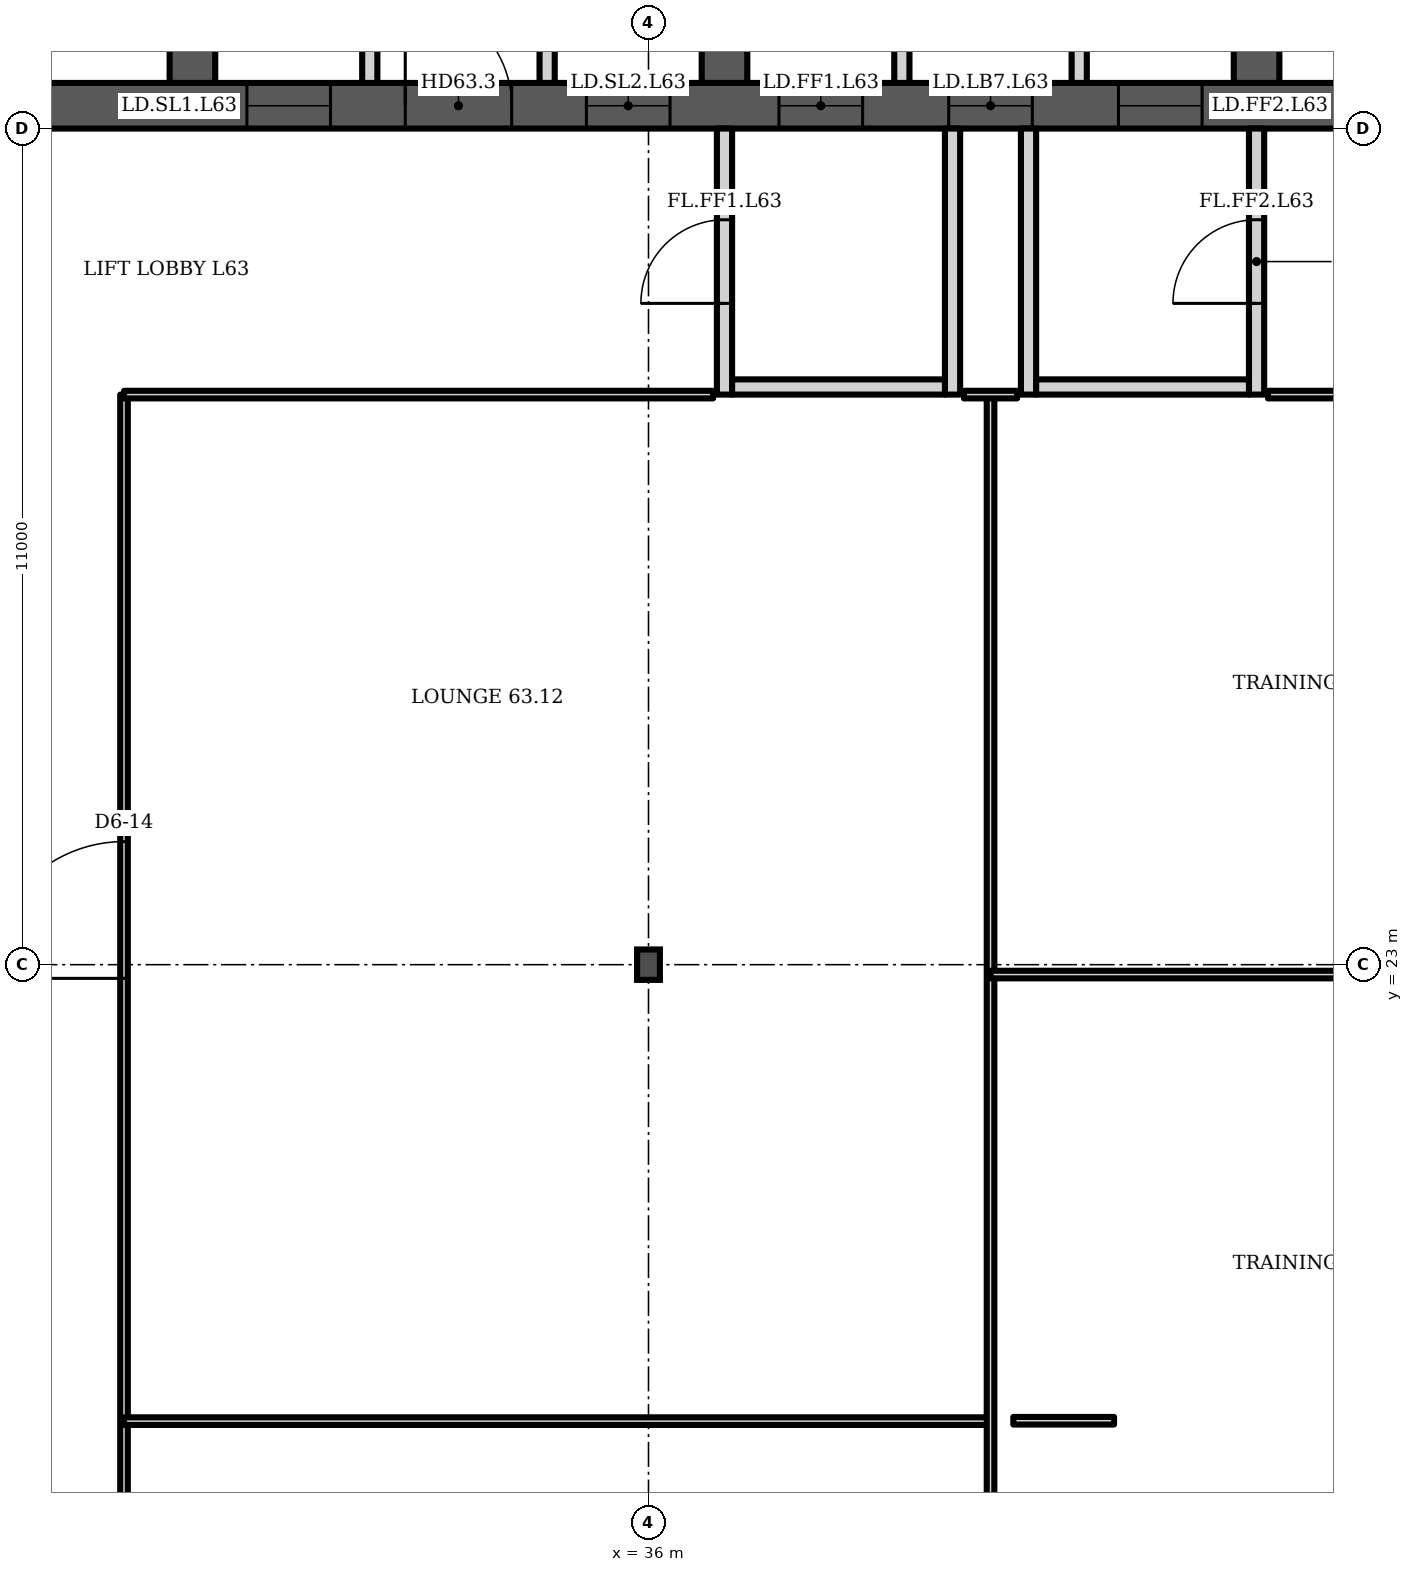
"""IFC4 building model, lengths in metres.
Left out: names, types, materials, properties, quantities, classifications, styles, units other than length and angle.
Written with IfcOpenShell. Run it as: python <this file> out.ifc"""

import sys

from ifc_helpers import new_model, si_unit, direction, frame, frame_2d, origin, origin_2d, place, context, subcontext, project, spatial, polyline, rectangle, i_section, outline, extrude, element, fill, save


model = new_model("IFC4")
c1 = context("Model", 3, precision=1e-05, world=origin(), true_north=direction((0.0, 1.0)))
c2 = subcontext(c1, "Body", "Model", "MODEL_VIEW")
j1 = project(units=[si_unit("LENGTHUNIT", "METRE"), si_unit("PLANEANGLEUNIT", "RADIAN")], contexts=[c1])
p1 = place(None, origin())
s1 = spatial("IfcSite", under=j1, at=p1, CompositionType="ELEMENT")
p2 = place(p1, origin())
s2 = spatial("IfcBuilding", under=s1, at=p2, CompositionType="ELEMENT")
p3 = place(p2, frame((0.0, 0.0, 250.3)))
s3 = spatial("IfcBuildingStorey", under=s2, at=p3, CompositionType="ELEMENT", Elevation=250.3)
p4 = place(p3, frame((23.0, 34.3, 0.0), z_axis=(0.0, 0.0, 1.0), x_axis=(1.0, 0.0, 0.0)))
e1 = element("IfcWall", 1, at=p4, inside=s3, PredefinedType="SHEAR", context=c2, shape_type="SweptSolid", body=[
    extrude(rectangle(XDim=35.0, YDim=0.6, at=frame_2d((17.5, 0.0))), origin(), (0.0, 0.0, 1.0), 3.6),
])
p5 = place(p4, frame((0.65, 0.0, 0.0)))
e2 = element("IfcOpeningElement", 2, at=p5, cuts=e1, PredefinedType="OPENING", context=c2, shape_type="SweptSolid", body=[
    extrude(rectangle(XDim=1.2, YDim=2.1, at=frame_2d((0.6, 1.05))), frame((0.0, 0.31, 0.0), z_axis=(0.0, -1.0, 0.0), x_axis=(1.0, 0.0, 0.0)), (0.0, 0.0, 1.0), 0.62),
])
p6 = place(p4, frame((7.717, 0.0, 0.0)))
e3 = element("IfcOpeningElement", 3, at=p6, cuts=e1, PredefinedType="OPENING", context=c2, shape_type="SweptSolid", body=[
    extrude(rectangle(XDim=1.1, YDim=2.1, at=frame_2d((0.55, 1.05))), frame((0.0, 0.31, 0.0), z_axis=(0.0, -1.0, 0.0), x_axis=(1.0, 0.0, 0.0)), (0.0, 0.0, 1.0), 0.62),
])
p7 = place(p4, frame((12.183, 0.0, 0.0)))
e4 = element("IfcOpeningElement", 4, at=p7, cuts=e1, PredefinedType="OPENING", context=c2, shape_type="SweptSolid", body=[
    extrude(rectangle(XDim=1.1, YDim=2.1, at=frame_2d((0.55, 1.05))), frame((0.0, 0.31, 0.0), z_axis=(0.0, -1.0, 0.0), x_axis=(1.0, 0.0, 0.0)), (0.0, 0.0, 1.0), 0.62),
])
p8 = place(p4, frame((9.8, 0.0, 0.0)))
e5 = element("IfcOpeningElement", 5, at=p8, cuts=e1, PredefinedType="OPENING", context=c2, shape_type="SweptSolid", body=[
    extrude(rectangle(XDim=1.4, YDim=2.1, at=frame_2d((0.7, 1.05))), frame((0.0, 0.31, 0.0), z_axis=(0.0, -1.0, 0.0), x_axis=(1.0, 0.0, 0.0)), (0.0, 0.0, 1.0), 0.62),
])
p9 = place(p4, frame((14.717, 0.0, 0.0)))
e6 = element("IfcOpeningElement", 6, at=p9, cuts=e1, PredefinedType="OPENING", context=c2, shape_type="SweptSolid", body=[
    extrude(rectangle(XDim=1.1, YDim=2.1, at=frame_2d((0.55, 1.05))), frame((0.0, 0.31, 0.0), z_axis=(0.0, -1.0, 0.0), x_axis=(1.0, 0.0, 0.0)), (0.0, 0.0, 1.0), 0.62),
])
p10 = place(p4, frame((16.95, 0.0, 0.0)))
e7 = element("IfcOpeningElement", 7, at=p10, cuts=e1, PredefinedType="OPENING", context=c2, shape_type="SweptSolid", body=[
    extrude(rectangle(XDim=1.1, YDim=2.1, at=frame_2d((0.55, 1.05))), frame((0.0, 0.31, 0.0), z_axis=(0.0, -1.0, 0.0), x_axis=(1.0, 0.0, 0.0)), (0.0, 0.0, 1.0), 0.62),
])
p11 = place(p4, frame((19.183, 0.0, 0.0)))
e8 = element("IfcOpeningElement", 8, at=p11, cuts=e1, PredefinedType="OPENING", context=c2, shape_type="SweptSolid", body=[
    extrude(rectangle(XDim=1.1, YDim=2.1, at=frame_2d((0.55, 1.05))), frame((0.0, 0.31, 0.0), z_axis=(0.0, -1.0, 0.0), x_axis=(1.0, 0.0, 0.0)), (0.0, 0.0, 1.0), 0.62),
])
p12 = place(p4, frame((26.15, 0.0, 0.0)))
e9 = element("IfcOpeningElement", 9, at=p12, cuts=e1, PredefinedType="OPENING", context=c2, shape_type="SweptSolid", body=[
    extrude(rectangle(XDim=1.2, YDim=2.1, at=frame_2d((0.6, 1.05))), frame((0.0, 0.31, 0.0), z_axis=(0.0, -1.0, 0.0), x_axis=(1.0, 0.0, 0.0)), (0.0, 0.0, 1.0), 0.62),
])
p13 = place(p4, frame((28.767, 0.0, 0.0)))
e10 = element("IfcOpeningElement", 10, at=p13, cuts=e1, PredefinedType="OPENING", context=c2, shape_type="SweptSolid", body=[
    extrude(rectangle(XDim=1.0, YDim=2.1, at=frame_2d((0.5, 1.05))), frame((0.0, 0.31, 0.0), z_axis=(0.0, -1.0, 0.0), x_axis=(1.0, 0.0, 0.0)), (0.0, 0.0, 1.0), 0.62),
])
p14 = place(p4, frame((33.083, 0.0, 0.0)))
e11 = element("IfcOpeningElement", 11, at=p14, cuts=e1, PredefinedType="OPENING", context=c2, shape_type="SweptSolid", body=[
    extrude(rectangle(XDim=1.0, YDim=2.1, at=frame_2d((0.5, 1.05))), frame((0.0, 0.31, 0.0), z_axis=(0.0, -1.0, 0.0), x_axis=(1.0, 0.0, 0.0)), (0.0, 0.0, 1.0), 0.62),
])
p15 = place(p4, frame((30.8, 0.0, 0.0)))
e12 = element("IfcOpeningElement", 12, at=p15, cuts=e1, PredefinedType="OPENING", context=c2, shape_type="SweptSolid", body=[
    extrude(rectangle(XDim=1.4, YDim=2.1, at=frame_2d((0.7, 1.05))), frame((0.0, 0.31, 0.0), z_axis=(0.0, -1.0, 0.0), x_axis=(1.0, 0.0, 0.0)), (0.0, 0.0, 1.0), 0.62),
])
p16 = place(p3, frame((30.0, 34.6, 0.0), z_axis=(0.0, 0.0, 1.0), x_axis=(0.0, 1.0, 0.0)))
e13 = element("IfcWall", 13, at=p16, inside=s3, PredefinedType="SHEAR", context=c2, shape_type="SweptSolid", body=[
    extrude(rectangle(XDim=14.171, YDim=0.6, at=frame_2d((7.085, 0.0))), origin(), (0.0, 0.0, 1.0), 3.6),
])
p17 = place(p16, frame((3.8, 0.0, 0.0)))
e14 = element("IfcOpeningElement", 14, at=p17, cuts=e13, PredefinedType="OPENING", context=c2, shape_type="SweptSolid", body=[
    extrude(rectangle(XDim=1.1, YDim=2.1, at=frame_2d((0.55, 1.05))), frame((0.0, 0.31, 0.0), z_axis=(0.0, -1.0, 0.0), x_axis=(1.0, 0.0, 0.0)), (0.0, 0.0, 1.0), 0.62),
])
p18 = place(p3, frame((37.0, 34.6, 0.0), z_axis=(0.0, 0.0, 1.0), x_axis=(0.0, 1.0, 0.0)))
e15 = element("IfcWall", 15, at=p18, inside=s3, PredefinedType="SHEAR", context=c2, shape_type="SweptSolid", body=[
    extrude(rectangle(XDim=14.784, YDim=0.6, at=frame_2d((7.392, 0.0))), origin(), (0.0, 0.0, 1.0), 3.6),
])
p19 = place(p18, frame((11.302, 0.0, 0.0)))
e16 = element("IfcOpeningElement", 16, at=p19, cuts=e15, PredefinedType="OPENING", context=c2, shape_type="SweptSolid", body=[
    extrude(rectangle(XDim=1.0, YDim=2.1, at=frame_2d((0.5, 1.05))), frame((0.0, 0.31, 0.0), z_axis=(0.0, -1.0, 0.0), x_axis=(1.0, 0.0, 0.0)), (0.0, 0.0, 1.0), 0.62),
])
p20 = place(p18, frame((3.8, 0.0, 0.0)))
e17 = element("IfcOpeningElement", 17, at=p20, cuts=e15, PredefinedType="OPENING", context=c2, shape_type="SweptSolid", body=[
    extrude(rectangle(XDim=1.1, YDim=2.1, at=frame_2d((0.55, 1.05))), frame((0.0, 0.31, 0.0), z_axis=(0.0, -1.0, 0.0), x_axis=(1.0, 0.0, 0.0)), (0.0, 0.0, 1.0), 0.62),
])
p21 = place(p3, frame((44.0, 34.6, 0.0), z_axis=(0.0, 0.0, 1.0), x_axis=(0.0, 1.0, 0.0)))
e18 = element("IfcWall", 18, at=p21, inside=s3, PredefinedType="SHEAR", context=c2, shape_type="SweptSolid", body=[
    extrude(rectangle(XDim=14.784, YDim=0.6, at=frame_2d((7.392, 0.0))), origin(), (0.0, 0.0, 1.0), 3.6),
])
p22 = place(p21, frame((11.608, 0.0, 0.0)))
e19 = element("IfcOpeningElement", 19, at=p22, cuts=e18, PredefinedType="OPENING", context=c2, shape_type="SweptSolid", body=[
    extrude(rectangle(XDim=1.0, YDim=2.1, at=frame_2d((0.5, 1.05))), frame((0.0, 0.31, 0.0), z_axis=(0.0, -1.0, 0.0), x_axis=(1.0, 0.0, 0.0)), (0.0, 0.0, 1.0), 0.62),
])
p23 = place(p21, frame((3.8, 0.0, 0.0)))
e20 = element("IfcOpeningElement", 20, at=p23, cuts=e18, PredefinedType="OPENING", context=c2, shape_type="SweptSolid", body=[
    extrude(rectangle(XDim=1.1, YDim=2.1, at=frame_2d((0.55, 1.05))), frame((0.0, 0.31, 0.0), z_axis=(0.0, -1.0, 0.0), x_axis=(1.0, 0.0, 0.0)), (0.0, 0.0, 1.0), 0.62),
])
p24 = place(p3, frame((36.0, 23.0, 0.0), z_axis=(0.0, 0.0, 1.0), x_axis=(1.0, 0.0, 0.0)))
e21 = element("IfcColumn", 21, at=p24, inside=s3, PredefinedType="COLUMN", context=c2, shape_type="SweptSolid", body=[
    extrude(i_section(OverallWidth=0.3, OverallDepth=0.4, WebThickness=0.013, FlangeThickness=0.024, FilletRadius=0.027, at=origin_2d()), origin(), (0.0, 0.0, 1.0), 3.6),
])
p25 = place(p3, frame((0.0, 0.0, -0.0)))
e22 = element("IfcWall", 22, at=p25, inside=s3, PredefinedType="PARTITIONING", context=c2, shape_type="SweptSolid", body=[
    extrude(outline(polyline([(32.233, 37.45), (30.3, 37.45), (30.3, 37.65), (32.233, 37.65), (32.433, 37.65), (32.433, 34.6), (32.233, 34.6), (32.233, 37.45)])), origin(), (0.0, 0.0, 1.0), 3.2),
])
p26 = place(p3, frame((0.0, 0.0, -0.0)))
e23 = element("IfcWall", 23, at=p26, inside=s3, PredefinedType="PARTITIONING", context=c2, shape_type="SweptSolid", body=[
    extrude(outline(polyline([(34.567, 37.65), (34.767, 37.65), (36.7, 37.65), (36.7, 37.45), (34.767, 37.45), (34.767, 34.6), (34.567, 34.6), (34.567, 37.65)])), origin(), (0.0, 0.0, 1.0), 3.2),
])
p27 = place(p3, frame((0.0, 0.0, -0.0)))
e24 = element("IfcWall", 24, at=p27, inside=s3, PredefinedType="PARTITIONING", context=c2, shape_type="SweptSolid", body=[
    extrude(outline(polyline([(41.567, 37.1), (39.433, 37.1), (39.433, 34.6), (39.233, 34.6), (39.233, 37.45), (37.3, 37.45), (37.3, 37.65), (39.233, 37.65), (39.433, 37.65), (39.433, 37.3), (41.567, 37.3), (41.567, 37.35), (41.767, 37.35), (43.7, 37.35), (43.7, 37.15), (41.767, 37.15), (41.767, 34.6), (41.567, 34.6), (41.567, 37.1)])), origin(), (0.0, 0.0, 1.0), 3.2),
])
p28 = place(p3, frame((37.0, 30.5, 0.0), z_axis=(0.0, 0.0, 1.0), x_axis=(0.0, 1.0, 0.0)))
e25 = element("IfcWall", 25, at=p28, inside=s3, PredefinedType="PARTITIONING", context=c2, shape_type="SweptSolid", body=[
    extrude(rectangle(XDim=3.5, YDim=0.2, at=frame_2d((1.75, 0.0))), origin(), (0.0, 0.0, 1.0), 3.2),
])
p29 = place(p28, frame((1.2, 0.0, 0.0)))
e26 = element("IfcOpeningElement", 26, at=p29, cuts=e25, PredefinedType="OPENING", context=c2, shape_type="SweptSolid", body=[
    extrude(rectangle(XDim=1.1, YDim=2.1, at=frame_2d((0.55, 1.05))), frame((0.0, 0.11, 0.0), z_axis=(0.0, -1.0, 0.0), x_axis=(1.0, 0.0, 0.0)), (0.0, 0.0, 1.0), 0.22),
])
p30 = place(p3, frame((40.0, 30.5, 0.0), z_axis=(0.0, 0.0, 1.0), x_axis=(0.0, 1.0, 0.0)))
e27 = element("IfcWall", 27, at=p30, inside=s3, PredefinedType="PARTITIONING", context=c2, shape_type="SweptSolid", body=[
    extrude(rectangle(XDim=3.5, YDim=0.2, at=frame_2d((1.75, 0.0))), origin(), (0.0, 0.0, 1.0), 3.2),
])
p31 = place(p3, frame((37.1, 30.6, 0.0), z_axis=(0.0, 0.0, 1.0), x_axis=(1.0, 0.0, 0.0)))
e28 = element("IfcWall", 28, at=p31, inside=s3, PredefinedType="PARTITIONING", context=c2, shape_type="SweptSolid", body=[
    extrude(rectangle(XDim=2.8, YDim=0.2, at=frame_2d((1.4, 0.0))), origin(), (0.0, 0.0, 1.0), 3.2),
])
p32 = place(p3, frame((41.0, 30.5, 0.0), z_axis=(0.0, 0.0, 1.0), x_axis=(0.0, 1.0, 0.0)))
e29 = element("IfcWall", 29, at=p32, inside=s3, PredefinedType="PARTITIONING", context=c2, shape_type="SweptSolid", body=[
    extrude(rectangle(XDim=3.5, YDim=0.2, at=frame_2d((1.75, 0.0))), origin(), (0.0, 0.0, 1.0), 3.2),
])
p33 = place(p3, frame((44.0, 30.5, 0.0), z_axis=(0.0, 0.0, 1.0), x_axis=(0.0, 1.0, 0.0)))
e30 = element("IfcWall", 30, at=p33, inside=s3, PredefinedType="PARTITIONING", context=c2, shape_type="SweptSolid", body=[
    extrude(rectangle(XDim=3.5, YDim=0.2, at=frame_2d((1.75, 0.0))), origin(), (0.0, 0.0, 1.0), 3.2),
])
p34 = place(p33, frame((1.2, 0.0, 0.0)))
e31 = element("IfcOpeningElement", 31, at=p34, cuts=e30, PredefinedType="OPENING", context=c2, shape_type="SweptSolid", body=[
    extrude(rectangle(XDim=1.1, YDim=2.1, at=frame_2d((0.55, 1.05))), frame((0.0, 0.11, 0.0), z_axis=(0.0, -1.0, 0.0), x_axis=(1.0, 0.0, 0.0)), (0.0, 0.0, 1.0), 0.22),
])
p35 = place(p3, frame((41.1, 30.6, 0.0), z_axis=(0.0, 0.0, 1.0), x_axis=(1.0, 0.0, 0.0)))
e32 = element("IfcWall", 32, at=p35, inside=s3, PredefinedType="PARTITIONING", context=c2, shape_type="SweptSolid", body=[
    extrude(rectangle(XDim=2.8, YDim=0.2, at=frame_2d((1.4, 0.0))), origin(), (0.0, 0.0, 1.0), 3.2),
])
p36 = place(p3, frame((29.1, 5.725, 0.0), z_axis=(0.0, 0.0, 1.0), x_axis=(0.0, 1.0, 0.0)))
e33 = element("IfcWall", 33, at=p36, inside=s3, PredefinedType="PARTITIONING", context=c2, shape_type="SweptSolid", body=[
    extrude(rectangle(XDim=24.775, YDim=0.1, at=frame_2d((12.387, 0.0))), origin(), (0.0, 0.0, 1.0), 3.2),
])
p37 = place(p36, frame((5.22, 0.0, 0.0)))
e34 = element("IfcOpeningElement", 34, at=p37, cuts=e33, PredefinedType="OPENING", context=c2, shape_type="SweptSolid", body=[
    extrude(rectangle(XDim=1.0, YDim=2.1, at=frame_2d((0.5, 1.05))), frame((0.0, 0.06, 0.0), z_axis=(0.0, -1.0, 0.0), x_axis=(1.0, 0.0, 0.0)), (0.0, 0.0, 1.0), 0.12),
])
p38 = place(p36, frame((17.095, 0.0, 0.0)))
e35 = element("IfcOpeningElement", 35, at=p38, cuts=e33, PredefinedType="OPENING", context=c2, shape_type="SweptSolid", body=[
    extrude(rectangle(XDim=1.8, YDim=2.1, at=frame_2d((0.9, 1.05))), frame((0.0, 0.06, 0.0), z_axis=(0.0, -1.0, 0.0), x_axis=(1.0, 0.0, 0.0)), (0.0, 0.0, 1.0), 0.12),
])
p39 = place(p3, frame((29.1, 16.995, 0.0), z_axis=(0.0, 0.0, 1.0), x_axis=(1.0, 0.0, 0.0)))
e36 = element("IfcWall", 36, at=p39, inside=s3, PredefinedType="PARTITIONING", context=c2, shape_type="SweptSolid", body=[
    extrude(rectangle(XDim=11.4, YDim=0.1, at=frame_2d((5.7, 0.0))), origin(), (0.0, 0.0, 1.0), 3.2),
])
p40 = place(p3, frame((29.1, 30.5, 0.0), z_axis=(0.0, 0.0, 1.0), x_axis=(1.0, 0.0, 0.0)))
e37 = element("IfcWall", 37, at=p40, inside=s3, PredefinedType="PARTITIONING", context=c2, shape_type="SweptSolid", body=[
    extrude(rectangle(XDim=7.75, YDim=0.1, at=frame_2d((3.875, 0.0))), origin(), (0.0, 0.0, 1.0), 3.2),
])
p41 = place(p3, frame((40.5, 13.463, 0.0), z_axis=(0.0, 0.0, 1.0), x_axis=(0.0, 1.0, 0.0)))
e38 = element("IfcWall", 38, at=p41, inside=s3, PredefinedType="PARTITIONING", context=c2, shape_type="SweptSolid", body=[
    extrude(rectangle(XDim=17.037, YDim=0.1, at=frame_2d((8.519, 0.0))), origin(), (0.0, 0.0, 1.0), 3.2),
])
p42 = place(p3, frame((40.5, 22.87, 0.0), z_axis=(0.0, 0.0, 1.0), x_axis=(1.0, 0.0, 0.0)))
e39 = element("IfcWall", 39, at=p42, inside=s3, PredefinedType="PARTITIONING", context=c2, shape_type="SweptSolid", body=[
    extrude(rectangle(XDim=9.52, YDim=0.1, at=frame_2d((4.76, 0.0))), origin(), (0.0, 0.0, 1.0), 3.2),
])
p43 = place(p3, frame((40.8, 17.0, 0.0), z_axis=(0.0, 0.0, 1.0), x_axis=(1.0, 0.0, 0.0)))
e40 = element("IfcWall", 40, at=p43, inside=s3, PredefinedType="PARTITIONING", context=c2, shape_type="SweptSolid", body=[
    extrude(rectangle(XDim=1.325, YDim=0.1, at=frame_2d((0.663, 0.0))), origin(), (0.0, 0.0, 1.0), 3.2),
])
p44 = place(p3, frame((40.15, 30.5, 0.0), z_axis=(0.0, 0.0, 1.0), x_axis=(1.0, 0.0, 0.0)))
e41 = element("IfcWall", 41, at=p44, inside=s3, PredefinedType="PARTITIONING", context=c2, shape_type="SweptSolid", body=[
    extrude(rectangle(XDim=0.7, YDim=0.1, at=frame_2d((0.35, 0.0))), origin(), (0.0, 0.0, 1.0), 3.2),
])
p45 = place(p3, frame((44.15, 30.5, 0.0), z_axis=(0.0, 0.0, 1.0), x_axis=(1.0, 0.0, 0.0)))
e42 = element("IfcWall", 42, at=p45, inside=s3, PredefinedType="PARTITIONING", context=c2, shape_type="SweptSolid", body=[
    extrude(rectangle(XDim=5.87, YDim=0.1, at=frame_2d((2.935, 0.0))), origin(), (0.0, 0.0, 1.0), 3.2),
])
p46 = place(p6, origin())
e43 = element("IfcDoor", 43, at=p46, inside=s3, OperationType="DOUBLE_DOOR_SLIDING", PredefinedType="DOOR", context=c2, shape_type="SweptSolid", body=[
    extrude(rectangle(XDim=1.1, YDim=2.1, at=frame_2d((0.55, 1.05))), frame((0.0, 0.025, 0.0), z_axis=(0.0, -1.0, 0.0), x_axis=(1.0, 0.0, 0.0)), (0.0, 0.0, 1.0), 0.05),
])
fill(e3, e43)
p47 = place(p7, origin())
e44 = element("IfcDoor", 44, at=p47, inside=s3, OperationType="DOUBLE_DOOR_SLIDING", PredefinedType="DOOR", context=c2, shape_type="SweptSolid", body=[
    extrude(rectangle(XDim=1.1, YDim=2.1, at=frame_2d((0.55, 1.05))), frame((0.0, 0.025, 0.0), z_axis=(0.0, -1.0, 0.0), x_axis=(1.0, 0.0, 0.0)), (0.0, 0.0, 1.0), 0.05),
])
fill(e4, e44)
p48 = place(p8, origin())
e45 = element("IfcDoor", 45, at=p48, inside=s3, OperationType="DOUBLE_DOOR_SINGLE_SWING", PredefinedType="DOOR", context=c2, shape_type="SweptSolid", body=[
    extrude(rectangle(XDim=1.4, YDim=2.1, at=frame_2d((0.7, 1.05))), frame((0.0, 0.025, 0.0), z_axis=(0.0, -1.0, 0.0), x_axis=(1.0, 0.0, 0.0)), (0.0, 0.0, 1.0), 0.05),
])
fill(e5, e45)
p49 = place(p9, origin())
e46 = element("IfcDoor", 46, at=p49, inside=s3, OperationType="DOUBLE_DOOR_SLIDING", PredefinedType="DOOR", context=c2, shape_type="SweptSolid", body=[
    extrude(rectangle(XDim=1.1, YDim=2.1, at=frame_2d((0.55, 1.05))), frame((0.0, 0.025, 0.0), z_axis=(0.0, -1.0, 0.0), x_axis=(1.0, 0.0, 0.0)), (0.0, 0.0, 1.0), 0.05),
])
fill(e6, e46)
p50 = place(p10, origin())
e47 = element("IfcDoor", 47, at=p50, inside=s3, OperationType="DOUBLE_DOOR_SLIDING", PredefinedType="DOOR", context=c2, shape_type="SweptSolid", body=[
    extrude(rectangle(XDim=1.1, YDim=2.1, at=frame_2d((0.55, 1.05))), frame((0.0, 0.025, 0.0), z_axis=(0.0, -1.0, 0.0), x_axis=(1.0, 0.0, 0.0)), (0.0, 0.0, 1.0), 0.05),
])
fill(e7, e47)
p51 = place(p11, origin())
e48 = element("IfcDoor", 48, at=p51, inside=s3, OperationType="DOUBLE_DOOR_SLIDING", PredefinedType="DOOR", context=c2, shape_type="SweptSolid", body=[
    extrude(rectangle(XDim=1.1, YDim=2.1, at=frame_2d((0.55, 1.05))), frame((0.0, 0.025, 0.0), z_axis=(0.0, -1.0, 0.0), x_axis=(1.0, 0.0, 0.0)), (0.0, 0.0, 1.0), 0.05),
])
fill(e8, e48)
p52 = place(p29, origin())
e49 = element("IfcDoor", 49, at=p52, inside=s3, OperationType="SINGLE_SWING_LEFT", PredefinedType="DOOR", context=c2, shape_type="SweptSolid", body=[
    extrude(rectangle(XDim=1.1, YDim=2.1, at=frame_2d((0.55, 1.05))), frame((0.0, 0.025, 0.0), z_axis=(0.0, -1.0, 0.0), x_axis=(1.0, 0.0, 0.0)), (0.0, 0.0, 1.0), 0.05),
])
fill(e26, e49)
p53 = place(p34, origin())
e50 = element("IfcDoor", 50, at=p53, inside=s3, OperationType="SINGLE_SWING_LEFT", PredefinedType="DOOR", context=c2, shape_type="SweptSolid", body=[
    extrude(rectangle(XDim=1.1, YDim=2.1, at=frame_2d((0.55, 1.05))), frame((0.0, 0.025, 0.0), z_axis=(0.0, -1.0, 0.0), x_axis=(1.0, 0.0, 0.0)), (0.0, 0.0, 1.0), 0.05),
])
fill(e31, e50)
p54 = place(p38, origin())
e51 = element("IfcDoor", 51, at=p54, inside=s3, OperationType="DOUBLE_DOOR_SINGLE_SWING", PredefinedType="DOOR", context=c2, shape_type="SweptSolid", body=[
    extrude(rectangle(XDim=1.8, YDim=2.1, at=frame_2d((0.9, 1.05))), frame((0.0, 0.025, 0.0), z_axis=(0.0, -1.0, 0.0), x_axis=(1.0, 0.0, 0.0)), (0.0, 0.0, 1.0), 0.05),
])
fill(e35, e51)
save(model, sys.argv[1])
